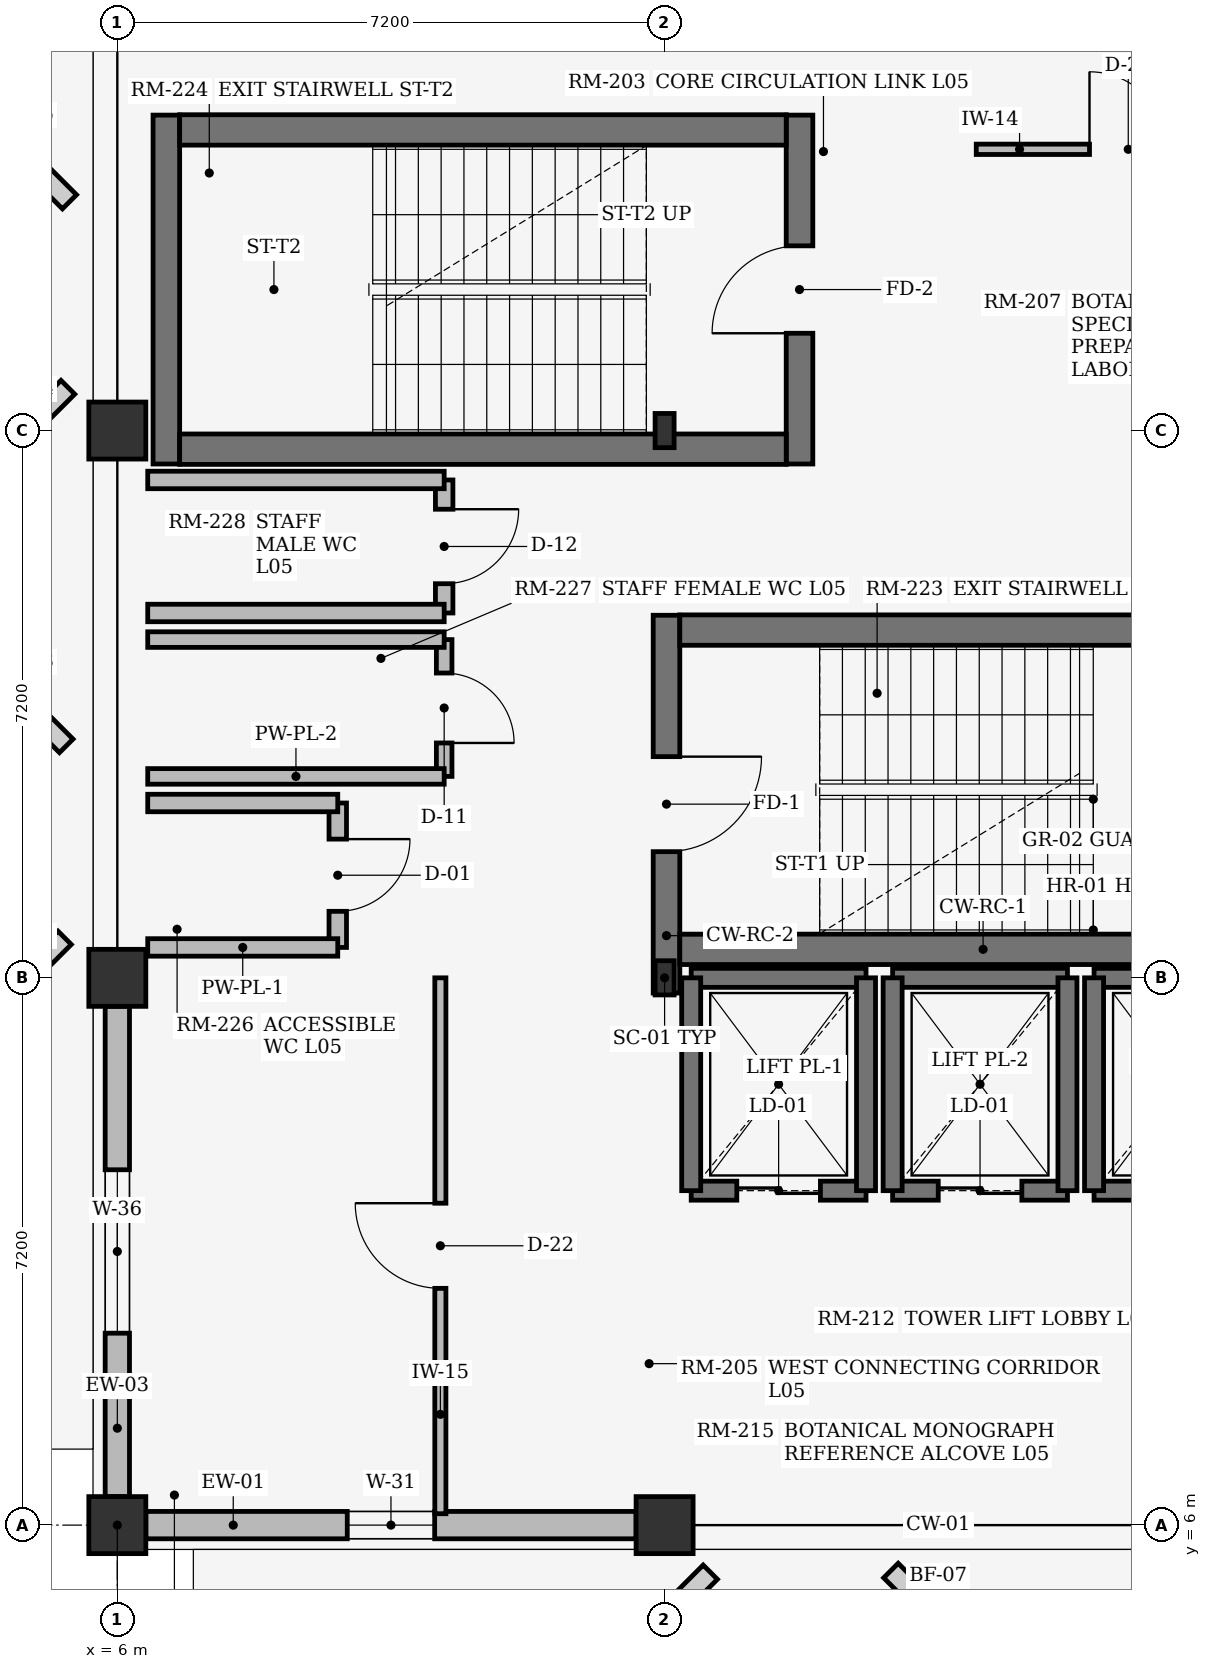
"""IFC4 building model, lengths in metres.
Left out: names, types, materials, properties, quantities, classifications, styles, units other than length and angle.
Written with IfcOpenShell. Run it as: python <this file> out.ifc"""

import sys

from ifc_helpers import new_model, si_unit, direction, frame, frame_2d, origin, origin_2d, place, context, subcontext, project, spatial, rectangle, i_section, extrude, element, fill, save


model = new_model("IFC4")
c1 = context("Model", 3, precision=1e-05, world=origin(), true_north=direction((0.0, 1.0)))
c2 = subcontext(c1, "Body", "Model", "MODEL_VIEW")
j1 = project(units=[si_unit("LENGTHUNIT", "METRE"), si_unit("PLANEANGLEUNIT", "RADIAN")], contexts=[c1])
p1 = place(None, origin())
s1 = spatial("IfcSite", under=j1, at=p1, CompositionType="ELEMENT")
p2 = place(p1, origin())
s2 = spatial("IfcBuilding", under=s1, at=p2, CompositionType="ELEMENT")
p3 = place(p2, frame((0.0, 0.0, 21.0)))
s3 = spatial("IfcBuildingStorey", under=s2, at=p3, CompositionType="ELEMENT", Elevation=21.0)
for number, where, z_axis, x_axis in (
    (1, (6.0, 6.0, 0.0), (0.0, 0.0, 1.0), (1.0, 0.0, 0.0)),
    (2, (6.0, 13.2, 0.0), (0.0, 0.0, 1.0), (1.0, 0.0, 0.0)),
    (3, (6.0, 20.4, 0.0), (0.0, 0.0, 1.0), (1.0, 0.0, 0.0)),
    (4, (13.2, 6.0, 0.0), (0.0, 0.0, 1.0), (1.0, 0.0, 0.0)),
):
    element("IfcColumn", number, at=place(p3, frame(where, z_axis=z_axis, x_axis=x_axis)), inside=s3, PredefinedType="COLUMN", context=c2, shape_type="SweptSolid", body=[
        extrude(rectangle(XDim=0.75, YDim=0.75, at=origin_2d()), origin(), (0.0, 0.0, 1.0), 3.67),
    ])
for number, where, z_axis, x_axis in (
    (5, (13.2, 13.2, 0.0), (0.0, 0.0, 1.0), (1.0, 0.0, 0.0)),
    (6, (13.2, 20.4, 0.0), (0.0, 0.0, 1.0), (1.0, 0.0, 0.0)),
):
    element("IfcColumn", number, at=place(p3, frame(where, z_axis=z_axis, x_axis=x_axis)), inside=s3, PredefinedType="COLUMN", context=c2, shape_type="SweptSolid", body=[
        extrude(i_section(OverallWidth=0.25, OverallDepth=0.45, WebThickness=0.011, FlangeThickness=0.014, at=origin_2d()), origin(), (0.0, 0.0, 1.0), 3.67),
    ])
p4 = place(p3, frame((6.375, 6.0, 0.0), z_axis=(0.0, 0.0, 1.0), x_axis=(1.0, 0.0, 0.0)))
e7 = element("IfcWall", 7, at=p4, inside=s3, PredefinedType="STANDARD", context=c2, shape_type="SweptSolid", body=[
    extrude(rectangle(XDim=6.45, YDim=0.36, at=frame_2d((3.225, 0.0))), origin(), (0.0, 0.0, 1.0), 3.05),
])
p5 = place(p4, frame((2.65, 0.0, 0.75)))
e8 = element("IfcOpeningElement", 8, at=p5, cuts=e7, PredefinedType="OPENING", context=c2, shape_type="SweptSolid", body=[
    extrude(rectangle(XDim=1.15, YDim=1.35, at=frame_2d((0.575, 0.675))), frame((0.0, 0.19, 0.0), z_axis=(0.0, -1.0, 0.0), x_axis=(1.0, 0.0, 0.0)), (0.0, 0.0, 1.0), 0.38),
])
p6 = place(p3, frame((6.0, 6.375, 0.0), z_axis=(0.0, 0.0, 1.0), x_axis=(0.0, 1.0, 0.0)))
e9 = element("IfcWall", 9, at=p6, inside=s3, PredefinedType="STANDARD", context=c2, shape_type="SweptSolid", body=[
    extrude(rectangle(XDim=6.45, YDim=0.32, at=frame_2d((3.225, 0.0))), origin(), (0.0, 0.0, 1.0), 3.05),
])
p7 = place(p6, frame((2.15, 0.0, 0.75)))
e10 = element("IfcOpeningElement", 10, at=p7, cuts=e9, PredefinedType="OPENING", context=c2, shape_type="SweptSolid", body=[
    extrude(rectangle(XDim=2.15, YDim=1.35, at=frame_2d((1.075, 0.675))), frame((0.0, 0.17, 0.0), z_axis=(0.0, -1.0, 0.0), x_axis=(1.0, 0.0, 0.0)), (0.0, 0.0, 1.0), 0.34),
])
p8 = place(p3, frame((13.225, 13.0, 0.0), z_axis=(0.0, 0.0, 1.0), x_axis=(0.0, 1.0, 0.0)))
e11 = element("IfcWall", 11, at=p8, inside=s3, PredefinedType="SHEAR", context=c2, shape_type="SweptSolid", body=[
    extrude(rectangle(XDim=4.97, YDim=0.35, at=frame_2d((2.485, 0.0))), origin(), (0.0, 0.0, 1.0), 3.67),
])
p9 = place(p8, frame((1.86, 0.0, 0.0)))
e12 = element("IfcOpeningElement", 12, at=p9, cuts=e11, PredefinedType="OPENING", context=c2, shape_type="SweptSolid", body=[
    extrude(rectangle(XDim=1.25, YDim=2.2, at=frame_2d((0.625, 1.1))), frame((0.0, 0.185, 0.0), z_axis=(0.0, -1.0, 0.0), x_axis=(1.0, 0.0, 0.0)), (0.0, 0.0, 1.0), 0.37),
])
for number, where, z_axis, x_axis in (
    (13, (13.4, 13.575, 0.0), (0.0, 0.0, 1.0), (1.0, 0.0, 0.0)),
    (14, (13.4, 17.775, 0.0), (0.0, 0.0, 1.0), (1.0, 0.0, 0.0)),
):
    element("IfcWall", number, at=place(p3, frame(where, z_axis=z_axis, x_axis=x_axis)), inside=s3, PredefinedType="SHEAR", context=c2, shape_type="SweptSolid", body=[
        extrude(rectangle(XDim=7.98, YDim=0.4, at=frame_2d((3.99, 0.0))), origin(), (0.0, 0.0, 1.0), 3.67),
    ])
p10 = place(p3, frame((14.975, 24.55, 0.0), z_axis=(0.0, 0.0, 1.0), x_axis=(0.0, -1.0, 0.0)))
e15 = element("IfcWall", 15, at=p10, inside=s3, PredefinedType="SHEAR", context=c2, shape_type="SweptSolid", body=[
    extrude(rectangle(XDim=4.59, YDim=0.35, at=frame_2d((2.295, 0.0))), origin(), (0.0, 0.0, 1.0), 3.67),
])
p11 = place(p10, frame((1.72, 0.0, 0.0)))
e16 = element("IfcOpeningElement", 16, at=p11, cuts=e15, PredefinedType="OPENING", context=c2, shape_type="SweptSolid", body=[
    extrude(rectangle(XDim=1.15, YDim=2.2, at=frame_2d((0.575, 1.1))), frame((0.0, 0.185, 0.0), z_axis=(0.0, -1.0, 0.0), x_axis=(1.0, 0.0, 0.0)), (0.0, 0.0, 1.0), 0.37),
])
p12 = place(p3, frame((6.645, 24.55, 0.0), z_axis=(0.0, 0.0, 1.0), x_axis=(0.0, -1.0, 0.0)))
e17 = element("IfcWall", 17, at=p12, inside=s3, PredefinedType="SHEAR", context=c2, shape_type="SweptSolid", body=[
    extrude(rectangle(XDim=4.59, YDim=0.35, at=frame_2d((2.295, 0.0))), origin(), (0.0, 0.0, 1.0), 3.67),
])
for number, where, z_axis, x_axis in (
    (18, (14.8, 24.355, 0.0), (0.0, 0.0, 1.0), (-1.0, 0.0, 0.0)),
    (19, (14.8, 20.155, 0.0), (0.0, 0.0, 1.0), (-1.0, 0.0, 0.0)),
):
    element("IfcWall", number, at=place(p3, frame(where, z_axis=z_axis, x_axis=x_axis)), inside=s3, PredefinedType="SHEAR", context=c2, shape_type="SweptSolid", body=[
        extrude(rectangle(XDim=7.98, YDim=0.4, at=frame_2d((3.99, 0.0))), origin(), (0.0, 0.0, 1.0), 3.67),
    ])
p13 = place(p3, frame((13.55, 10.4, 0.0), z_axis=(0.0, 0.0, 1.0), x_axis=(1.0, 0.0, 0.0)))
e20 = element("IfcWall", 20, at=p13, inside=s3, PredefinedType="SHEAR", context=c2, shape_type="SweptSolid", body=[
    extrude(rectangle(XDim=2.3, YDim=0.25, at=frame_2d((1.15, 0.0))), origin(), (0.0, 0.0, 1.0), 3.67),
])
p14 = place(p13, frame((0.6, 0.0, 0.0)))
e21 = element("IfcOpeningElement", 21, at=p14, cuts=e20, PredefinedType="OPENING", context=c2, shape_type="SweptSolid", body=[
    extrude(rectangle(XDim=1.1, YDim=2.2, at=frame_2d((0.55, 1.1))), frame((0.0, 0.135, 0.0), z_axis=(0.0, -1.0, 0.0), x_axis=(1.0, 0.0, 0.0)), (0.0, 0.0, 1.0), 0.27),
])
p15 = place(p3, frame((13.55, 13.2, 0.0), z_axis=(0.0, 0.0, 1.0), x_axis=(1.0, 0.0, 0.0)))
e22 = element("IfcWall", 22, at=p15, inside=s3, PredefinedType="SHEAR", context=c2, shape_type="SweptSolid", body=[
    extrude(rectangle(XDim=2.3, YDim=0.25, at=frame_2d((1.15, 0.0))), origin(), (0.0, 0.0, 1.0), 3.67),
])
for number, where, z_axis, x_axis in (
    (23, (13.55, 10.4, 0.0), (0.0, 0.0, 1.0), (0.0, 1.0, 0.0)),
    (24, (15.85, 10.4, 0.0), (0.0, 0.0, 1.0), (0.0, 1.0, 0.0)),
):
    element("IfcWall", number, at=place(p3, frame(where, z_axis=z_axis, x_axis=x_axis)), inside=s3, PredefinedType="SHEAR", context=c2, shape_type="SweptSolid", body=[
        extrude(rectangle(XDim=2.8, YDim=0.25, at=frame_2d((1.4, 0.0))), origin(), (0.0, 0.0, 1.0), 3.67),
    ])
p16 = place(p3, frame((16.2, 10.4, 0.0), z_axis=(0.0, 0.0, 1.0), x_axis=(1.0, 0.0, 0.0)))
e25 = element("IfcWall", 25, at=p16, inside=s3, PredefinedType="SHEAR", context=c2, shape_type="SweptSolid", body=[
    extrude(rectangle(XDim=2.3, YDim=0.25, at=frame_2d((1.15, 0.0))), origin(), (0.0, 0.0, 1.0), 3.67),
])
p17 = place(p16, frame((0.6, 0.0, 0.0)))
e26 = element("IfcOpeningElement", 26, at=p17, cuts=e25, PredefinedType="OPENING", context=c2, shape_type="SweptSolid", body=[
    extrude(rectangle(XDim=1.1, YDim=2.2, at=frame_2d((0.55, 1.1))), frame((0.0, 0.135, 0.0), z_axis=(0.0, -1.0, 0.0), x_axis=(1.0, 0.0, 0.0)), (0.0, 0.0, 1.0), 0.27),
])
p18 = place(p3, frame((16.2, 13.2, 0.0), z_axis=(0.0, 0.0, 1.0), x_axis=(1.0, 0.0, 0.0)))
e27 = element("IfcWall", 27, at=p18, inside=s3, PredefinedType="SHEAR", context=c2, shape_type="SweptSolid", body=[
    extrude(rectangle(XDim=2.3, YDim=0.25, at=frame_2d((1.15, 0.0))), origin(), (0.0, 0.0, 1.0), 3.67),
])
for number, where, z_axis, x_axis in (
    (28, (16.2, 10.4, 0.0), (0.0, 0.0, 1.0), (0.0, 1.0, 0.0)),
    (29, (18.5, 10.4, 0.0), (0.0, 0.0, 1.0), (0.0, 1.0, 0.0)),
):
    element("IfcWall", number, at=place(p3, frame(where, z_axis=z_axis, x_axis=x_axis)), inside=s3, PredefinedType="SHEAR", context=c2, shape_type="SweptSolid", body=[
        extrude(rectangle(XDim=2.8, YDim=0.25, at=frame_2d((1.4, 0.0))), origin(), (0.0, 0.0, 1.0), 3.67),
    ])
p19 = place(p3, frame((18.85, 10.4, 0.0), z_axis=(0.0, 0.0, 1.0), x_axis=(1.0, 0.0, 0.0)))
e30 = element("IfcWall", 30, at=p19, inside=s3, PredefinedType="SHEAR", context=c2, shape_type="SweptSolid", body=[
    extrude(rectangle(XDim=2.3, YDim=0.25, at=frame_2d((1.15, 0.0))), origin(), (0.0, 0.0, 1.0), 3.67),
])
p20 = place(p19, frame((0.6, 0.0, 0.0)))
e31 = element("IfcOpeningElement", 31, at=p20, cuts=e30, PredefinedType="OPENING", context=c2, shape_type="SweptSolid", body=[
    extrude(rectangle(XDim=1.1, YDim=2.2, at=frame_2d((0.55, 1.1))), frame((0.0, 0.135, 0.0), z_axis=(0.0, -1.0, 0.0), x_axis=(1.0, 0.0, 0.0)), (0.0, 0.0, 1.0), 0.27),
])
p21 = place(p3, frame((18.85, 13.2, 0.0), z_axis=(0.0, 0.0, 1.0), x_axis=(1.0, 0.0, 0.0)))
e32 = element("IfcWall", 32, at=p21, inside=s3, PredefinedType="SHEAR", context=c2, shape_type="SweptSolid", body=[
    extrude(rectangle(XDim=2.3, YDim=0.25, at=frame_2d((1.15, 0.0))), origin(), (0.0, 0.0, 1.0), 3.67),
])
p22 = place(p3, frame((18.85, 10.4, 0.0), z_axis=(0.0, 0.0, 1.0), x_axis=(0.0, 1.0, 0.0)))
e33 = element("IfcWall", 33, at=p22, inside=s3, PredefinedType="SHEAR", context=c2, shape_type="SweptSolid", body=[
    extrude(rectangle(XDim=2.8, YDim=0.25, at=frame_2d((1.4, 0.0))), origin(), (0.0, 0.0, 1.0), 3.67),
])
p23 = place(p3, frame((8.9, 13.6, 0.0), z_axis=(0.0, 0.0, 1.0), x_axis=(0.0, 1.0, 0.0)))
e34 = element("IfcWall", 34, at=p23, inside=s3, PredefinedType="PLUMBINGWALL", context=c2, shape_type="SweptSolid", body=[
    extrude(rectangle(XDim=1.9, YDim=0.23, at=frame_2d((0.95, 0.0))), origin(), (0.0, 0.0, 1.0), 3.65),
])
p24 = place(p23, frame((0.475, 0.0, 0.0)))
e35 = element("IfcOpeningElement", 35, at=p24, cuts=e34, PredefinedType="OPENING", context=c2, shape_type="SweptSolid", body=[
    extrude(rectangle(XDim=0.95, YDim=2.15, at=frame_2d((0.475, 1.075))), frame((0.0, 0.125, 0.0), z_axis=(0.0, -1.0, 0.0), x_axis=(1.0, 0.0, 0.0)), (0.0, 0.0, 1.0), 0.25),
])
for number, where, z_axis, x_axis in (
    (36, (6.4, 13.6, 0.0), (0.0, 0.0, 1.0), (1.0, 0.0, 0.0)),
    (37, (6.4, 15.5, 0.0), (0.0, 0.0, 1.0), (1.0, 0.0, 0.0)),
):
    element("IfcWall", number, at=place(p3, frame(where, z_axis=z_axis, x_axis=x_axis)), inside=s3, PredefinedType="PLUMBINGWALL", context=c2, shape_type="SweptSolid", body=[
        extrude(rectangle(XDim=2.5, YDim=0.23, at=frame_2d((1.25, 0.0))), origin(), (0.0, 0.0, 1.0), 3.65),
    ])
p25 = place(p3, frame((10.3, 15.85, 0.0), z_axis=(0.0, 0.0, 1.0), x_axis=(0.0, 1.0, 0.0)))
e38 = element("IfcWall", 38, at=p25, inside=s3, PredefinedType="PLUMBINGWALL", context=c2, shape_type="SweptSolid", body=[
    extrude(rectangle(XDim=1.8, YDim=0.205, at=frame_2d((0.9, 0.0))), origin(), (0.0, 0.0, 1.0), 3.65),
])
p26 = place(p25, frame((0.44, 0.0, 0.0)))
e39 = element("IfcOpeningElement", 39, at=p26, cuts=e38, PredefinedType="OPENING", context=c2, shape_type="SweptSolid", body=[
    extrude(rectangle(XDim=0.92, YDim=2.1, at=frame_2d((0.46, 1.05))), frame((0.0, 0.113, 0.0), z_axis=(0.0, -1.0, 0.0), x_axis=(1.0, 0.0, 0.0)), (0.0, 0.0, 1.0), 0.225),
])
for number, where, z_axis, x_axis in (
    (40, (6.4, 15.85, 0.0), (0.0, 0.0, 1.0), (1.0, 0.0, 0.0)),
    (41, (6.4, 17.65, 0.0), (0.0, 0.0, 1.0), (1.0, 0.0, 0.0)),
):
    element("IfcWall", number, at=place(p3, frame(where, z_axis=z_axis, x_axis=x_axis)), inside=s3, PredefinedType="PLUMBINGWALL", context=c2, shape_type="SweptSolid", body=[
        extrude(rectangle(XDim=3.9, YDim=0.205, at=frame_2d((1.95, 0.0))), origin(), (0.0, 0.0, 1.0), 3.65),
    ])
p27 = place(p3, frame((10.3, 18.0, 0.0), z_axis=(0.0, 0.0, 1.0), x_axis=(0.0, 1.0, 0.0)))
e42 = element("IfcWall", 42, at=p27, inside=s3, PredefinedType="PLUMBINGWALL", context=c2, shape_type="SweptSolid", body=[
    extrude(rectangle(XDim=1.75, YDim=0.23, at=frame_2d((0.875, 0.0))), origin(), (0.0, 0.0, 1.0), 3.65),
])
p28 = place(p27, frame((0.385, 0.0, 0.0)))
e43 = element("IfcOpeningElement", 43, at=p28, cuts=e42, PredefinedType="OPENING", context=c2, shape_type="SweptSolid", body=[
    extrude(rectangle(XDim=0.98, YDim=2.1, at=frame_2d((0.49, 1.05))), frame((0.0, 0.125, 0.0), z_axis=(0.0, -1.0, 0.0), x_axis=(1.0, 0.0, 0.0)), (0.0, 0.0, 1.0), 0.25),
])
for number, where, z_axis, x_axis in (
    (44, (6.4, 18.0, 0.0), (0.0, 0.0, 1.0), (1.0, 0.0, 0.0)),
    (45, (6.4, 19.75, 0.0), (0.0, 0.0, 1.0), (1.0, 0.0, 0.0)),
):
    element("IfcWall", number, at=place(p3, frame(where, z_axis=z_axis, x_axis=x_axis)), inside=s3, PredefinedType="PLUMBINGWALL", context=c2, shape_type="SweptSolid", body=[
        extrude(rectangle(XDim=3.9, YDim=0.23, at=frame_2d((1.95, 0.0))), origin(), (0.0, 0.0, 1.0), 3.65),
    ])
p29 = place(p3, frame((17.3, 24.1, 0.0), z_axis=(0.0, 0.0, 1.0), x_axis=(1.0, 0.0, 0.0)))
e46 = element("IfcWall", 46, at=p29, inside=s3, PredefinedType="PARTITIONING", context=c2, shape_type="SweptSolid", body=[
    extrude(rectangle(XDim=4.0, YDim=0.136, at=frame_2d((2.0, 0.0))), origin(), (0.0, 0.0, 1.0), 3.65),
])
p30 = place(p29, frame((1.49, 0.0, 0.0)))
e47 = element("IfcOpeningElement", 47, at=p30, cuts=e46, PredefinedType="OPENING", context=c2, shape_type="SweptSolid", body=[
    extrude(rectangle(XDim=1.02, YDim=2.18, at=frame_2d((0.51, 1.09))), frame((0.0, 0.078, 0.0), z_axis=(0.0, -1.0, 0.0), x_axis=(1.0, 0.0, 0.0)), (0.0, 0.0, 1.0), 0.156),
])
p31 = place(p3, frame((10.25, 6.15, 0.0), z_axis=(0.0, 0.0, 1.0), x_axis=(0.0, 1.0, 0.0)))
e48 = element("IfcWall", 48, at=p31, inside=s3, PredefinedType="PARTITIONING", context=c2, shape_type="SweptSolid", body=[
    extrude(rectangle(XDim=7.05, YDim=0.146, at=frame_2d((3.525, 0.0))), origin(), (0.0, 0.0, 1.0), 3.65),
])
p32 = place(p31, frame((2.965, 0.0, 0.0)))
e49 = element("IfcOpeningElement", 49, at=p32, cuts=e48, PredefinedType="OPENING", context=c2, shape_type="SweptSolid", body=[
    extrude(rectangle(XDim=1.12, YDim=2.22, at=frame_2d((0.56, 1.11))), frame((0.0, 0.083, 0.0), z_axis=(0.0, -1.0, 0.0), x_axis=(1.0, 0.0, 0.0)), (0.0, 0.0, 1.0), 0.166),
])
p33 = place(p5, origin())
e50 = element("IfcWindow", 50, at=p33, inside=s3, PartitioningType="SINGLE_PANEL", PredefinedType="WINDOW", context=c2, shape_type="SweptSolid", body=[
    extrude(rectangle(XDim=1.15, YDim=1.35, at=frame_2d((0.575, 0.675))), frame((0.0, 0.03, 0.0), z_axis=(0.0, -1.0, 0.0), x_axis=(1.0, 0.0, 0.0)), (0.0, 0.0, 1.0), 0.06),
])
fill(e8, e50)
p34 = place(p7, origin())
e51 = element("IfcWindow", 51, at=p34, inside=s3, PartitioningType="SINGLE_PANEL", PredefinedType="WINDOW", context=c2, shape_type="SweptSolid", body=[
    extrude(rectangle(XDim=2.15, YDim=1.35, at=frame_2d((1.075, 0.675))), frame((0.0, 0.03, 0.0), z_axis=(0.0, -1.0, 0.0), x_axis=(1.0, 0.0, 0.0)), (0.0, 0.0, 1.0), 0.06),
])
fill(e10, e51)
p35 = place(p9, origin())
e52 = element("IfcDoor", 52, at=p35, inside=s3, OperationType="SINGLE_SWING_RIGHT", PredefinedType="DOOR", context=c2, shape_type="SweptSolid", body=[
    extrude(rectangle(XDim=1.25, YDim=2.2, at=frame_2d((0.625, 1.1))), frame((0.0, 0.025, 0.0), z_axis=(0.0, -1.0, 0.0), x_axis=(1.0, 0.0, 0.0)), (0.0, 0.0, 1.0), 0.05),
])
fill(e12, e52)
p36 = place(p11, origin())
e53 = element("IfcDoor", 53, at=p36, inside=s3, OperationType="SINGLE_SWING_RIGHT", PredefinedType="DOOR", context=c2, shape_type="SweptSolid", body=[
    extrude(rectangle(XDim=1.15, YDim=2.2, at=frame_2d((0.575, 1.1))), frame((0.0, 0.025, 0.0), z_axis=(0.0, -1.0, 0.0), x_axis=(1.0, 0.0, 0.0)), (0.0, 0.0, 1.0), 0.05),
])
fill(e16, e53)
p37 = place(p14, origin())
e54 = element("IfcDoor", 54, at=p37, inside=s3, OperationType="DOUBLE_DOOR_SLIDING", PredefinedType="DOOR", context=c2, shape_type="SweptSolid", body=[
    extrude(rectangle(XDim=1.1, YDim=2.2, at=frame_2d((0.55, 1.1))), frame((0.0, 0.025, 0.0), z_axis=(0.0, -1.0, 0.0), x_axis=(1.0, 0.0, 0.0)), (0.0, 0.0, 1.0), 0.05),
])
fill(e21, e54)
p38 = place(p17, origin())
e55 = element("IfcDoor", 55, at=p38, inside=s3, OperationType="DOUBLE_DOOR_SLIDING", PredefinedType="DOOR", context=c2, shape_type="SweptSolid", body=[
    extrude(rectangle(XDim=1.1, YDim=2.2, at=frame_2d((0.55, 1.1))), frame((0.0, 0.025, 0.0), z_axis=(0.0, -1.0, 0.0), x_axis=(1.0, 0.0, 0.0)), (0.0, 0.0, 1.0), 0.05),
])
fill(e26, e55)
p39 = place(p24, origin())
e56 = element("IfcDoor", 56, at=p39, inside=s3, OperationType="SINGLE_SWING_RIGHT", PredefinedType="DOOR", context=c2, shape_type="SweptSolid", body=[
    extrude(rectangle(XDim=0.95, YDim=2.15, at=frame_2d((0.475, 1.075))), frame((0.0, 0.025, 0.0), z_axis=(0.0, -1.0, 0.0), x_axis=(1.0, 0.0, 0.0)), (0.0, 0.0, 1.0), 0.05),
])
fill(e35, e56)
p40 = place(p26, frame((0.92, 0.0, 0.0), z_axis=(0.0, 0.0, 1.0), x_axis=(-1.0, 0.0, 0.0)))
e57 = element("IfcDoor", 57, at=p40, inside=s3, OperationType="SINGLE_SWING_LEFT", PredefinedType="DOOR", context=c2, shape_type="SweptSolid", body=[
    extrude(rectangle(XDim=0.92, YDim=2.1, at=frame_2d((0.46, 1.05))), frame((0.0, 0.025, 0.0), z_axis=(0.0, -1.0, 0.0), x_axis=(1.0, 0.0, 0.0)), (0.0, 0.0, 1.0), 0.05),
])
fill(e39, e57)
p41 = place(p28, origin())
e58 = element("IfcDoor", 58, at=p41, inside=s3, OperationType="SINGLE_SWING_RIGHT", PredefinedType="DOOR", context=c2, shape_type="SweptSolid", body=[
    extrude(rectangle(XDim=0.98, YDim=2.1, at=frame_2d((0.49, 1.05))), frame((0.0, 0.025, 0.0), z_axis=(0.0, -1.0, 0.0), x_axis=(1.0, 0.0, 0.0)), (0.0, 0.0, 1.0), 0.05),
])
fill(e43, e58)
p42 = place(p30, origin())
e59 = element("IfcDoor", 59, at=p42, inside=s3, OperationType="SINGLE_SWING_LEFT", PredefinedType="DOOR", context=c2, shape_type="SweptSolid", body=[
    extrude(rectangle(XDim=1.02, YDim=2.18, at=frame_2d((0.51, 1.09))), frame((0.0, 0.025, 0.0), z_axis=(0.0, -1.0, 0.0), x_axis=(1.0, 0.0, 0.0)), (0.0, 0.0, 1.0), 0.05),
])
fill(e47, e59)
p43 = place(p32, frame((1.12, 0.0, 0.0), z_axis=(0.0, 0.0, 1.0), x_axis=(-1.0, 0.0, 0.0)))
e60 = element("IfcDoor", 60, at=p43, inside=s3, OperationType="SINGLE_SWING_RIGHT", PredefinedType="DOOR", context=c2, shape_type="SweptSolid", body=[
    extrude(rectangle(XDim=1.12, YDim=2.22, at=frame_2d((0.56, 1.11))), frame((0.0, 0.025, 0.0), z_axis=(0.0, -1.0, 0.0), x_axis=(1.0, 0.0, 0.0)), (0.0, 0.0, 1.0), 0.05),
])
fill(e49, e60)
save(model, sys.argv[1])
